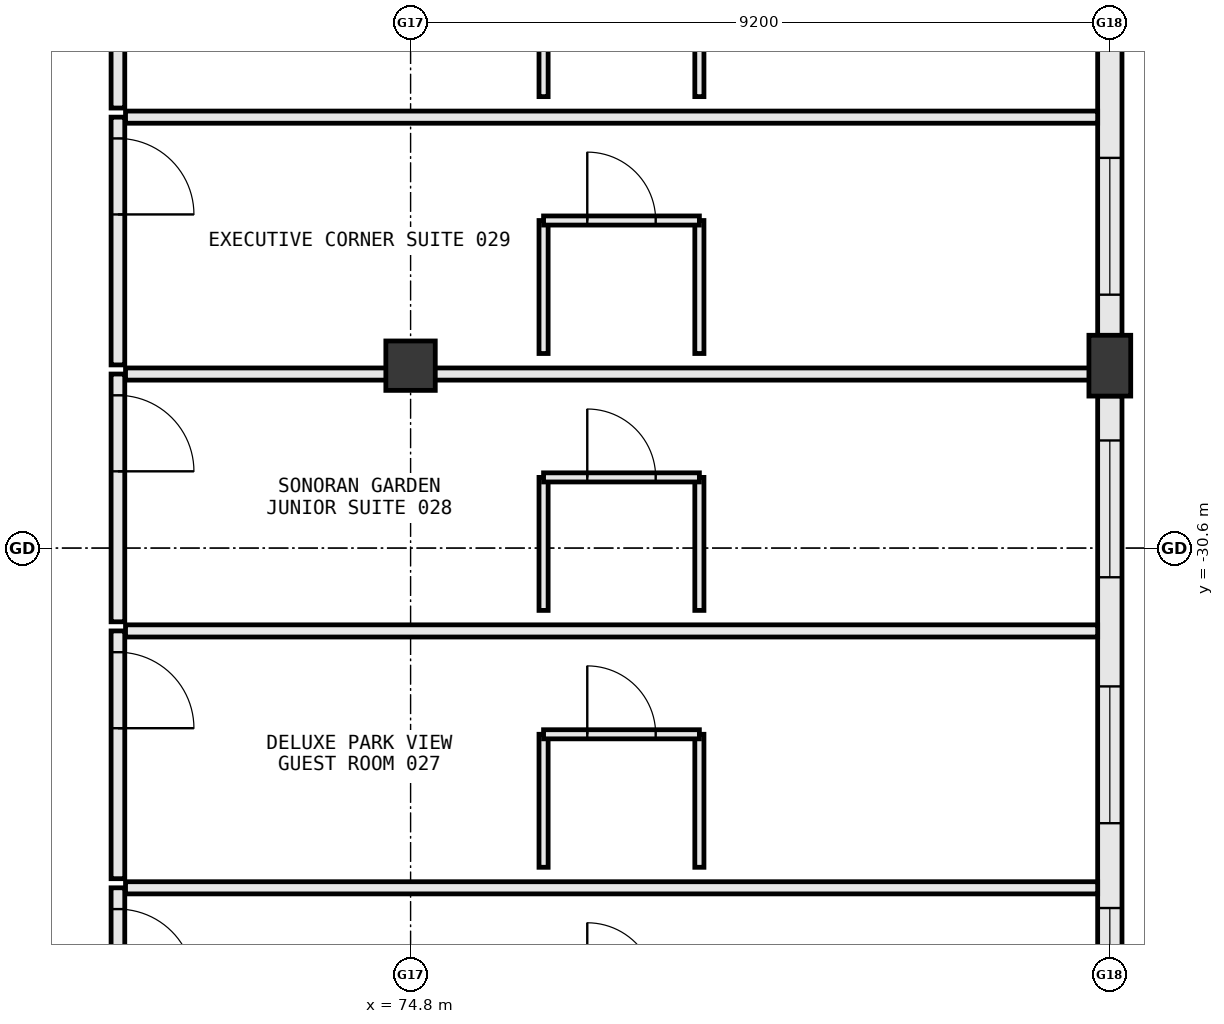
"""IFC4 building model, lengths in metres.
Left out: names, types, materials, properties, quantities, classifications, styles, units other than length and angle.
Written with IfcOpenShell. Run it as: python <this file> out.ifc"""

import sys

from ifc_helpers import new_model, si_unit, direction, frame, frame_2d, origin, origin_2d, place, context, subcontext, project, spatial, rectangle, extrude, element, fill, save


model = new_model("IFC4")
c1 = context("Model", 3, precision=1e-05, world=origin(), true_north=direction((0.0, 1.0)))
c2 = subcontext(c1, "Body", "Model", "MODEL_VIEW")
j1 = project(units=[si_unit("LENGTHUNIT", "METRE"), si_unit("PLANEANGLEUNIT", "RADIAN")], contexts=[c1])
p1 = place(None, origin())
s1 = spatial("IfcSite", under=j1, at=p1, CompositionType="ELEMENT")
p2 = place(p1, origin())
s2 = spatial("IfcBuilding", under=s1, at=p2, CompositionType="ELEMENT")
p3 = place(p2, frame((0.0, 0.0, 10.8)))
s3 = spatial("IfcBuildingStorey", under=s2, at=p3, CompositionType="ELEMENT", Elevation=10.8)
p4 = place(p3, frame((74.8, -28.2, 0.0), z_axis=(0.0, 0.0, 1.0), x_axis=(1.0, 0.0, 0.0)))
e1 = element("IfcColumn", 1, at=p4, inside=s3, PredefinedType="COLUMN", context=c2, shape_type="SweptSolid", body=[
    extrude(rectangle(XDim=0.65, YDim=0.65, at=origin_2d()), origin(), (0.0, 0.0, 1.0), 5.4),
])
p5 = place(p3, frame((84.0, -28.2, 0.0), z_axis=(0.0, 0.0, 1.0), x_axis=(1.0, 0.0, 0.0)))
e2 = element("IfcColumn", 2, at=p5, inside=s3, PredefinedType="PILASTER", context=c2, shape_type="SweptSolid", body=[
    extrude(rectangle(XDim=0.55, YDim=0.8, at=origin_2d()), origin(), (0.0, 0.0, 1.0), 5.4),
])
p6 = place(p3, frame((84.0, -37.402, 0.0), z_axis=(0.0, 0.0, 1.0), x_axis=(0.0, 1.0, 0.0)))
e3 = element("IfcWall", 3, at=p6, inside=s3, PredefinedType="STANDARD", context=c2, shape_type="SweptSolid", body=[
    extrude(rectangle(XDim=8.804, YDim=0.32, at=frame_2d((4.402, 0.0))), origin(), (0.0, 0.0, 1.0), 4.332),
])
p7 = place(p6, frame((0.266, 0.0, 0.85)))
e4 = element("IfcOpeningElement", 4, at=p7, cuts=e3, PredefinedType="OPENING", context=c2, shape_type="SweptSolid", body=[
    extrude(rectangle(XDim=1.8, YDim=1.85, at=frame_2d((0.9, 0.925))), frame((0.0, 0.172, 0.0), z_axis=(0.0, -1.0, 0.0), x_axis=(1.0, 0.0, 0.0)), (0.0, 0.0, 1.0), 0.344),
])
p8 = place(p6, frame((3.182, 0.0, 0.85)))
e5 = element("IfcOpeningElement", 5, at=p8, cuts=e3, PredefinedType="OPENING", context=c2, shape_type="SweptSolid", body=[
    extrude(rectangle(XDim=1.8, YDim=1.85, at=frame_2d((0.9, 0.925))), frame((0.0, 0.172, 0.0), z_axis=(0.0, -1.0, 0.0), x_axis=(1.0, 0.0, 0.0)), (0.0, 0.0, 1.0), 0.344),
])
p9 = place(p6, frame((6.418, 0.0, 0.85)))
e6 = element("IfcOpeningElement", 6, at=p9, cuts=e3, PredefinedType="OPENING", context=c2, shape_type="SweptSolid", body=[
    extrude(rectangle(XDim=1.8, YDim=1.85, at=frame_2d((0.9, 0.925))), frame((0.0, 0.172, 0.0), z_axis=(0.0, -1.0, 0.0), x_axis=(1.0, 0.0, 0.0)), (0.0, 0.0, 1.0), 0.344),
])
p10 = place(p3, frame((84.0, -27.802, 0.0), z_axis=(0.0, 0.0, 1.0), x_axis=(0.0, 1.0, 0.0)))
e7 = element("IfcWall", 7, at=p10, inside=s3, PredefinedType="STANDARD", context=c2, shape_type="SweptSolid", body=[
    extrude(rectangle(XDim=4.004, YDim=0.32, at=frame_2d((2.002, 0.0))), origin(), (0.0, 0.0, 1.0), 4.332),
])
p11 = place(p10, frame((0.536, 0.0, 0.85)))
e8 = element("IfcOpeningElement", 8, at=p11, cuts=e7, PredefinedType="OPENING", context=c2, shape_type="SweptSolid", body=[
    extrude(rectangle(XDim=1.8, YDim=1.85, at=frame_2d((0.9, 0.925))), frame((0.0, 0.172, 0.0), z_axis=(0.0, -1.0, 0.0), x_axis=(1.0, 0.0, 0.0)), (0.0, 0.0, 1.0), 0.344),
])
p12 = place(p3, frame((70.95, -35.07, 0.0), z_axis=(0.0, 0.0, 1.0), x_axis=(0.0, -1.0, 0.0)))
e9 = element("IfcWall", 9, at=p12, inside=s3, PredefinedType="PARTITIONING", context=c2, shape_type="SweptSolid", body=[
    extrude(rectangle(XDim=3.26, YDim=0.18, at=frame_2d((1.63, 0.0))), origin(), (0.0, 0.0, 1.0), 4.8),
])
p13 = place(p12, frame((0.28, 0.0, 0.0)))
e10 = element("IfcOpeningElement", 10, at=p13, cuts=e9, PredefinedType="OPENING", context=c2, shape_type="SweptSolid", body=[
    extrude(rectangle(XDim=1.0, YDim=2.2, at=frame_2d((0.5, 1.1))), frame((0.0, 0.102, 0.0), z_axis=(0.0, -1.0, 0.0), x_axis=(1.0, 0.0, 0.0)), (0.0, 0.0, 1.0), 0.204),
])
p14 = place(p3, frame((71.05, -35.07, 0.0), z_axis=(0.0, 0.0, 1.0), x_axis=(1.0, 0.0, 0.0)))
e11 = element("IfcWall", 11, at=p14, inside=s3, PredefinedType="PARTITIONING", context=c2, shape_type="SweptSolid", body=[
    extrude(rectangle(XDim=12.79, YDim=0.16, at=frame_2d((6.395, 0.0))), origin(), (0.0, 0.0, 1.0), 4.8),
])
p15 = place(p3, frame((70.95, -31.69, 0.0), z_axis=(0.0, 0.0, 1.0), x_axis=(0.0, -1.0, 0.0)))
e12 = element("IfcWall", 12, at=p15, inside=s3, PredefinedType="PARTITIONING", context=c2, shape_type="SweptSolid", body=[
    extrude(rectangle(XDim=3.26, YDim=0.18, at=frame_2d((1.63, 0.0))), origin(), (0.0, 0.0, 1.0), 4.8),
])
p16 = place(p15, frame((0.28, 0.0, 0.0)))
e13 = element("IfcOpeningElement", 13, at=p16, cuts=e12, PredefinedType="OPENING", context=c2, shape_type="SweptSolid", body=[
    extrude(rectangle(XDim=1.0, YDim=2.2, at=frame_2d((0.5, 1.1))), frame((0.0, 0.102, 0.0), z_axis=(0.0, -1.0, 0.0), x_axis=(1.0, 0.0, 0.0)), (0.0, 0.0, 1.0), 0.204),
])
p17 = place(p3, frame((71.05, -31.69, 0.0), z_axis=(0.0, 0.0, 1.0), x_axis=(1.0, 0.0, 0.0)))
e14 = element("IfcWall", 14, at=p17, inside=s3, PredefinedType="PARTITIONING", context=c2, shape_type="SweptSolid", body=[
    extrude(rectangle(XDim=12.79, YDim=0.16, at=frame_2d((6.395, 0.0))), origin(), (0.0, 0.0, 1.0), 4.8),
])
for number, where, z_axis, x_axis in (
    (15, (76.55, -34.8, 0.0), (0.0, 0.0, 1.0), (0.0, 1.0, 0.0)),
    (16, (78.6, -34.8, 0.0), (0.0, 0.0, 1.0), (0.0, 1.0, 0.0)),
):
    element("IfcWall", number, at=place(p3, frame(where, z_axis=z_axis, x_axis=x_axis)), inside=s3, PredefinedType="PARTITIONING", context=c2, shape_type="SweptSolid", body=[
        extrude(rectangle(XDim=1.75, YDim=0.12, at=frame_2d((0.875, 0.0))), origin(), (0.0, 0.0, 1.0), 4.8),
    ])
p18 = place(p3, frame((76.55, -33.05, 0.0), z_axis=(0.0, 0.0, 1.0), x_axis=(1.0, 0.0, 0.0)))
e17 = element("IfcWall", 17, at=p18, inside=s3, PredefinedType="PARTITIONING", context=c2, shape_type="SweptSolid", body=[
    extrude(rectangle(XDim=2.05, YDim=0.12, at=frame_2d((1.025, 0.0))), origin(), (0.0, 0.0, 1.0), 4.8),
])
p19 = place(p18, frame((0.575, 0.0, 0.0)))
e18 = element("IfcOpeningElement", 18, at=p19, cuts=e17, PredefinedType="OPENING", context=c2, shape_type="SweptSolid", body=[
    extrude(rectangle(XDim=0.9, YDim=2.15, at=frame_2d((0.45, 1.075))), frame((0.0, 0.072, 0.0), z_axis=(0.0, -1.0, 0.0), x_axis=(1.0, 0.0, 0.0)), (0.0, 0.0, 1.0), 0.144),
])
p20 = place(p3, frame((70.95, -28.31, 0.0), z_axis=(0.0, 0.0, 1.0), x_axis=(0.0, -1.0, 0.0)))
e19 = element("IfcWall", 19, at=p20, inside=s3, PredefinedType="PARTITIONING", context=c2, shape_type="SweptSolid", body=[
    extrude(rectangle(XDim=3.26, YDim=0.18, at=frame_2d((1.63, 0.0))), origin(), (0.0, 0.0, 1.0), 4.8),
])
p21 = place(p20, frame((0.28, 0.0, 0.0)))
e20 = element("IfcOpeningElement", 20, at=p21, cuts=e19, PredefinedType="OPENING", context=c2, shape_type="SweptSolid", body=[
    extrude(rectangle(XDim=1.0, YDim=2.2, at=frame_2d((0.5, 1.1))), frame((0.0, 0.102, 0.0), z_axis=(0.0, -1.0, 0.0), x_axis=(1.0, 0.0, 0.0)), (0.0, 0.0, 1.0), 0.204),
])
p22 = place(p3, frame((71.05, -28.31, 0.0), z_axis=(0.0, 0.0, 1.0), x_axis=(1.0, 0.0, 0.0)))
e21 = element("IfcWall", 21, at=p22, inside=s3, PredefinedType="PARTITIONING", context=c2, shape_type="SweptSolid", body=[
    extrude(rectangle(XDim=12.79, YDim=0.16, at=frame_2d((6.395, 0.0))), origin(), (0.0, 0.0, 1.0), 3.775),
])
for number, where, z_axis, x_axis in (
    (22, (76.55, -31.42, 0.0), (0.0, 0.0, 1.0), (0.0, 1.0, 0.0)),
    (23, (78.6, -31.42, 0.0), (0.0, 0.0, 1.0), (0.0, 1.0, 0.0)),
):
    element("IfcWall", number, at=place(p3, frame(where, z_axis=z_axis, x_axis=x_axis)), inside=s3, PredefinedType="PARTITIONING", context=c2, shape_type="SweptSolid", body=[
        extrude(rectangle(XDim=1.75, YDim=0.12, at=frame_2d((0.875, 0.0))), origin(), (0.0, 0.0, 1.0), 4.8),
    ])
p23 = place(p3, frame((76.55, -29.67, 0.0), z_axis=(0.0, 0.0, 1.0), x_axis=(1.0, 0.0, 0.0)))
e24 = element("IfcWall", 24, at=p23, inside=s3, PredefinedType="PARTITIONING", context=c2, shape_type="SweptSolid", body=[
    extrude(rectangle(XDim=2.05, YDim=0.12, at=frame_2d((1.025, 0.0))), origin(), (0.0, 0.0, 1.0), 4.8),
])
p24 = place(p23, frame((0.575, 0.0, 0.0)))
e25 = element("IfcOpeningElement", 25, at=p24, cuts=e24, PredefinedType="OPENING", context=c2, shape_type="SweptSolid", body=[
    extrude(rectangle(XDim=0.9, YDim=2.15, at=frame_2d((0.45, 1.075))), frame((0.0, 0.072, 0.0), z_axis=(0.0, -1.0, 0.0), x_axis=(1.0, 0.0, 0.0)), (0.0, 0.0, 1.0), 0.144),
])
p25 = place(p3, frame((70.95, -24.93, 0.0), z_axis=(0.0, 0.0, 1.0), x_axis=(0.0, -1.0, 0.0)))
e26 = element("IfcWall", 26, at=p25, inside=s3, PredefinedType="PARTITIONING", context=c2, shape_type="SweptSolid", body=[
    extrude(rectangle(XDim=3.26, YDim=0.18, at=frame_2d((1.63, 0.0))), origin(), (0.0, 0.0, 1.0), 4.8),
])
p26 = place(p25, frame((0.28, 0.0, 0.0)))
e27 = element("IfcOpeningElement", 27, at=p26, cuts=e26, PredefinedType="OPENING", context=c2, shape_type="SweptSolid", body=[
    extrude(rectangle(XDim=1.0, YDim=2.2, at=frame_2d((0.5, 1.1))), frame((0.0, 0.102, 0.0), z_axis=(0.0, -1.0, 0.0), x_axis=(1.0, 0.0, 0.0)), (0.0, 0.0, 1.0), 0.204),
])
p27 = place(p3, frame((71.05, -24.93, 0.0), z_axis=(0.0, 0.0, 1.0), x_axis=(1.0, 0.0, 0.0)))
e28 = element("IfcWall", 28, at=p27, inside=s3, PredefinedType="PARTITIONING", context=c2, shape_type="SweptSolid", body=[
    extrude(rectangle(XDim=12.79, YDim=0.16, at=frame_2d((6.395, 0.0))), origin(), (0.0, 0.0, 1.0), 4.8),
])
for number, where, z_axis, x_axis in (
    (29, (76.55, -28.04, 0.0), (0.0, 0.0, 1.0), (0.0, 1.0, 0.0)),
    (30, (78.6, -28.04, 0.0), (0.0, 0.0, 1.0), (0.0, 1.0, 0.0)),
):
    element("IfcWall", number, at=place(p3, frame(where, z_axis=z_axis, x_axis=x_axis)), inside=s3, PredefinedType="PARTITIONING", context=c2, shape_type="SweptSolid", body=[
        extrude(rectangle(XDim=1.75, YDim=0.12, at=frame_2d((0.875, 0.0))), origin(), (0.0, 0.0, 1.0), 4.8),
    ])
p28 = place(p3, frame((76.55, -26.29, 0.0), z_axis=(0.0, 0.0, 1.0), x_axis=(1.0, 0.0, 0.0)))
e31 = element("IfcWall", 31, at=p28, inside=s3, PredefinedType="PARTITIONING", context=c2, shape_type="SweptSolid", body=[
    extrude(rectangle(XDim=2.05, YDim=0.12, at=frame_2d((1.025, 0.0))), origin(), (0.0, 0.0, 1.0), 4.8),
])
p29 = place(p28, frame((0.575, 0.0, 0.0)))
e32 = element("IfcOpeningElement", 32, at=p29, cuts=e31, PredefinedType="OPENING", context=c2, shape_type="SweptSolid", body=[
    extrude(rectangle(XDim=0.9, YDim=2.15, at=frame_2d((0.45, 1.075))), frame((0.0, 0.072, 0.0), z_axis=(0.0, -1.0, 0.0), x_axis=(1.0, 0.0, 0.0)), (0.0, 0.0, 1.0), 0.144),
])
p30 = place(p3, frame((70.95, -21.55, 0.0), z_axis=(0.0, 0.0, 1.0), x_axis=(0.0, -1.0, 0.0)))
e33 = element("IfcWall", 33, at=p30, inside=s3, PredefinedType="PARTITIONING", context=c2, shape_type="SweptSolid", body=[
    extrude(rectangle(XDim=3.26, YDim=0.18, at=frame_2d((1.63, 0.0))), origin(), (0.0, 0.0, 1.0), 4.8),
])
p31 = place(p30, frame((0.28, 0.0, 0.0)))
e34 = element("IfcOpeningElement", 34, at=p31, cuts=e33, PredefinedType="OPENING", context=c2, shape_type="SweptSolid", body=[
    extrude(rectangle(XDim=1.0, YDim=2.2, at=frame_2d((0.5, 1.1))), frame((0.0, 0.102, 0.0), z_axis=(0.0, -1.0, 0.0), x_axis=(1.0, 0.0, 0.0)), (0.0, 0.0, 1.0), 0.204),
])
for number, where, z_axis, x_axis in (
    (35, (76.55, -24.66, 0.0), (0.0, 0.0, 1.0), (0.0, 1.0, 0.0)),
    (36, (78.6, -24.66, 0.0), (0.0, 0.0, 1.0), (0.0, 1.0, 0.0)),
):
    element("IfcWall", number, at=place(p3, frame(where, z_axis=z_axis, x_axis=x_axis)), inside=s3, PredefinedType="PARTITIONING", context=c2, shape_type="SweptSolid", body=[
        extrude(rectangle(XDim=1.75, YDim=0.12, at=frame_2d((0.875, 0.0))), origin(), (0.0, 0.0, 1.0), 4.8),
    ])
p32 = place(p7, origin())
e37 = element("IfcWindow", 37, at=p32, inside=s3, PartitioningType="SINGLE_PANEL", PredefinedType="WINDOW", context=c2, shape_type="SweptSolid", body=[
    extrude(rectangle(XDim=1.8, YDim=1.85, at=frame_2d((0.9, 0.925))), frame((0.0, 0.03, 0.0), z_axis=(0.0, -1.0, 0.0), x_axis=(1.0, 0.0, 0.0)), (0.0, 0.0, 1.0), 0.06),
])
fill(e4, e37)
p33 = place(p8, origin())
e38 = element("IfcWindow", 38, at=p33, inside=s3, PartitioningType="SINGLE_PANEL", PredefinedType="WINDOW", context=c2, shape_type="SweptSolid", body=[
    extrude(rectangle(XDim=1.8, YDim=1.85, at=frame_2d((0.9, 0.925))), frame((0.0, 0.03, 0.0), z_axis=(0.0, -1.0, 0.0), x_axis=(1.0, 0.0, 0.0)), (0.0, 0.0, 1.0), 0.06),
])
fill(e5, e38)
p34 = place(p9, origin())
e39 = element("IfcWindow", 39, at=p34, inside=s3, PartitioningType="SINGLE_PANEL", PredefinedType="WINDOW", context=c2, shape_type="SweptSolid", body=[
    extrude(rectangle(XDim=1.8, YDim=1.85, at=frame_2d((0.9, 0.925))), frame((0.0, 0.03, 0.0), z_axis=(0.0, -1.0, 0.0), x_axis=(1.0, 0.0, 0.0)), (0.0, 0.0, 1.0), 0.06),
])
fill(e6, e39)
p35 = place(p11, origin())
e40 = element("IfcWindow", 40, at=p35, inside=s3, PartitioningType="SINGLE_PANEL", PredefinedType="WINDOW", context=c2, shape_type="SweptSolid", body=[
    extrude(rectangle(XDim=1.8, YDim=1.85, at=frame_2d((0.9, 0.925))), frame((0.0, 0.03, 0.0), z_axis=(0.0, -1.0, 0.0), x_axis=(1.0, 0.0, 0.0)), (0.0, 0.0, 1.0), 0.06),
])
fill(e8, e40)
p36 = place(p13, origin())
e41 = element("IfcDoor", 41, at=p36, inside=s3, OperationType="SINGLE_SWING_RIGHT", PredefinedType="DOOR", context=c2, shape_type="SweptSolid", body=[
    extrude(rectangle(XDim=1.0, YDim=2.2, at=frame_2d((0.5, 1.1))), frame((0.0, 0.025, 0.0), z_axis=(0.0, -1.0, 0.0), x_axis=(1.0, 0.0, 0.0)), (0.0, 0.0, 1.0), 0.05),
])
fill(e10, e41)
p37 = place(p16, origin())
e42 = element("IfcDoor", 42, at=p37, inside=s3, OperationType="SINGLE_SWING_RIGHT", PredefinedType="DOOR", context=c2, shape_type="SweptSolid", body=[
    extrude(rectangle(XDim=1.0, YDim=2.2, at=frame_2d((0.5, 1.1))), frame((0.0, 0.025, 0.0), z_axis=(0.0, -1.0, 0.0), x_axis=(1.0, 0.0, 0.0)), (0.0, 0.0, 1.0), 0.05),
])
fill(e13, e42)
p38 = place(p19, origin())
e43 = element("IfcDoor", 43, at=p38, inside=s3, OperationType="SINGLE_SWING_LEFT", PredefinedType="DOOR", context=c2, shape_type="SweptSolid", body=[
    extrude(rectangle(XDim=0.9, YDim=2.15, at=frame_2d((0.45, 1.075))), frame((0.0, 0.025, 0.0), z_axis=(0.0, -1.0, 0.0), x_axis=(1.0, 0.0, 0.0)), (0.0, 0.0, 1.0), 0.05),
])
fill(e18, e43)
p39 = place(p21, origin())
e44 = element("IfcDoor", 44, at=p39, inside=s3, OperationType="SINGLE_SWING_RIGHT", PredefinedType="DOOR", context=c2, shape_type="SweptSolid", body=[
    extrude(rectangle(XDim=1.0, YDim=2.2, at=frame_2d((0.5, 1.1))), frame((0.0, 0.025, 0.0), z_axis=(0.0, -1.0, 0.0), x_axis=(1.0, 0.0, 0.0)), (0.0, 0.0, 1.0), 0.05),
])
fill(e20, e44)
p40 = place(p24, origin())
e45 = element("IfcDoor", 45, at=p40, inside=s3, OperationType="SINGLE_SWING_LEFT", PredefinedType="DOOR", context=c2, shape_type="SweptSolid", body=[
    extrude(rectangle(XDim=0.9, YDim=2.15, at=frame_2d((0.45, 1.075))), frame((0.0, 0.025, 0.0), z_axis=(0.0, -1.0, 0.0), x_axis=(1.0, 0.0, 0.0)), (0.0, 0.0, 1.0), 0.05),
])
fill(e25, e45)
p41 = place(p26, origin())
e46 = element("IfcDoor", 46, at=p41, inside=s3, OperationType="SINGLE_SWING_RIGHT", PredefinedType="DOOR", context=c2, shape_type="SweptSolid", body=[
    extrude(rectangle(XDim=1.0, YDim=2.2, at=frame_2d((0.5, 1.1))), frame((0.0, 0.025, 0.0), z_axis=(0.0, -1.0, 0.0), x_axis=(1.0, 0.0, 0.0)), (0.0, 0.0, 1.0), 0.05),
])
fill(e27, e46)
p42 = place(p29, origin())
e47 = element("IfcDoor", 47, at=p42, inside=s3, OperationType="SINGLE_SWING_LEFT", PredefinedType="DOOR", context=c2, shape_type="SweptSolid", body=[
    extrude(rectangle(XDim=0.9, YDim=2.15, at=frame_2d((0.45, 1.075))), frame((0.0, 0.025, 0.0), z_axis=(0.0, -1.0, 0.0), x_axis=(1.0, 0.0, 0.0)), (0.0, 0.0, 1.0), 0.05),
])
fill(e32, e47)
save(model, sys.argv[1])
